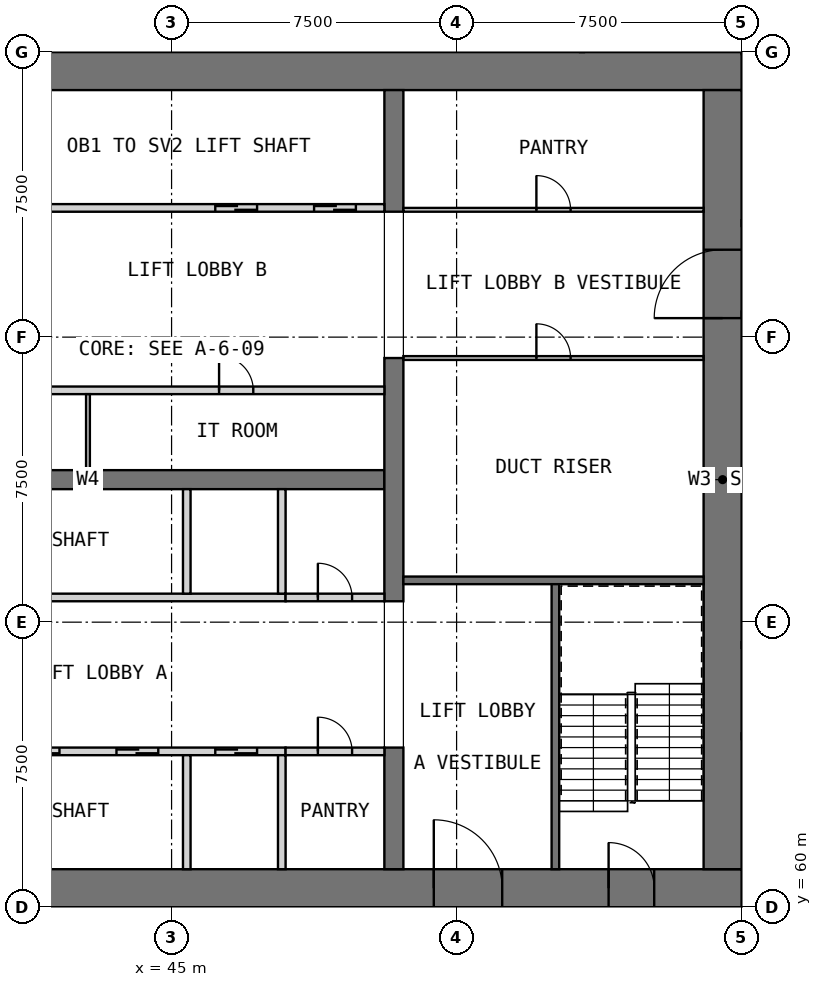
"""IFC4 building model, lengths in metres.
Left out: names, types, materials, properties, quantities, classifications, styles, units other than length and angle.
Written with IfcOpenShell. Run it as: python <this file> out.ifc"""

import sys

from ifc_helpers import new_model, si_unit, direction, frame, frame_2d, origin, place, context, subcontext, project, spatial, rectangle, extrude, element, fill, save


model = new_model("IFC4")
c1 = context("Model", 3, precision=1e-05, world=origin(), true_north=direction((0.0, 1.0)))
c2 = subcontext(c1, "Body", "Model", "MODEL_VIEW")
j1 = project(units=[si_unit("LENGTHUNIT", "METRE"), si_unit("PLANEANGLEUNIT", "RADIAN")], contexts=[c1])
p1 = place(None, origin())
s1 = spatial("IfcSite", under=j1, at=p1, CompositionType="ELEMENT")
p2 = place(p1, origin())
s2 = spatial("IfcBuilding", under=s1, at=p2, CompositionType="ELEMENT")
p3 = place(p2, frame((0.0, 0.0, 34.0)))
s3 = spatial("IfcBuildingStorey", under=s2, at=p3, CompositionType="ELEMENT", Elevation=34.0)
p4 = place(p3, frame((30.0, 60.5, 0.0), z_axis=(0.0, 0.0, 1.0), x_axis=(1.0, 0.0, 0.0)))
e1 = element("IfcWall", 1, at=p4, inside=s3, PredefinedType="SHEAR", context=c2, shape_type="SweptSolid", body=[
    extrude(rectangle(XDim=30.0, YDim=1.0, at=frame_2d((15.0, 0.0))), origin(), (0.0, 0.0, 1.0), 3.6),
])
p5 = place(p4, frame((21.9, 0.0, 0.0)))
e2 = element("IfcOpeningElement", 2, at=p5, cuts=e1, PredefinedType="OPENING", context=c2, shape_type="SweptSolid", body=[
    extrude(rectangle(XDim=1.8, YDim=2.1, at=frame_2d((0.9, 1.05))), frame((0.0, 0.51, 0.0), z_axis=(0.0, -1.0, 0.0), x_axis=(1.0, 0.0, 0.0)), (0.0, 0.0, 1.0), 1.02),
])
p6 = place(p4, frame((26.5, 0.0, 0.0)))
e3 = element("IfcOpeningElement", 3, at=p6, cuts=e1, PredefinedType="OPENING", context=c2, shape_type="SweptSolid", body=[
    extrude(rectangle(XDim=1.2, YDim=2.1, at=frame_2d((0.6, 1.05))), frame((0.0, 0.51, 0.0), z_axis=(0.0, -1.0, 0.0), x_axis=(1.0, 0.0, 0.0)), (0.0, 0.0, 1.0), 1.02),
])
p7 = place(p3, frame((30.0, 82.0, 0.0), z_axis=(0.0, 0.0, 1.0), x_axis=(1.0, 0.0, 0.0)))
e4 = element("IfcWall", 4, at=p7, inside=s3, PredefinedType="SHEAR", context=c2, shape_type="SweptSolid", body=[
    extrude(rectangle(XDim=30.0, YDim=1.0, at=frame_2d((15.0, 0.0))), origin(), (0.0, 0.0, 1.0), 3.6),
])
p8 = place(p3, frame((59.5, 61.0, 0.0), z_axis=(0.0, 0.0, 1.0), x_axis=(0.0, 1.0, 0.0)))
e5 = element("IfcWall", 5, at=p8, inside=s3, PredefinedType="SHEAR", context=c2, shape_type="SweptSolid", body=[
    extrude(rectangle(XDim=20.5, YDim=1.0, at=frame_2d((10.25, 0.0))), origin(), (0.0, 0.0, 1.0), 3.6),
])
p9 = place(p8, frame((14.5, 0.0, 0.0)))
e6 = element("IfcOpeningElement", 6, at=p9, cuts=e5, PredefinedType="OPENING", context=c2, shape_type="SweptSolid", body=[
    extrude(rectangle(XDim=1.8, YDim=2.1, at=frame_2d((0.9, 1.05))), frame((0.0, 0.51, 0.0), z_axis=(0.0, -1.0, 0.0), x_axis=(1.0, 0.0, 0.0)), (0.0, 0.0, 1.0), 1.02),
])
p10 = place(p3, frame((35.0, 71.25, 0.0), z_axis=(0.0, 0.0, 1.0), x_axis=(1.0, 0.0, 0.0)))
e7 = element("IfcWall", 7, at=p10, inside=s3, PredefinedType="SHEAR", context=c2, shape_type="SweptSolid", body=[
    extrude(rectangle(XDim=15.6, YDim=0.5, at=frame_2d((7.8, 0.0))), origin(), (0.0, 0.0, 1.0), 3.6),
])
p11 = place(p3, frame((50.85, 61.0, 0.0), z_axis=(0.0, 0.0, 1.0), x_axis=(0.0, 1.0, 0.0)))
e8 = element("IfcWall", 8, at=p11, inside=s3, PredefinedType="SHEAR", context=c2, shape_type="SweptSolid", body=[
    extrude(rectangle(XDim=3.2, YDim=0.5, at=frame_2d((1.6, 0.0))), origin(), (0.0, 0.0, 1.0), 3.6),
])
p12 = place(p3, frame((50.85, 68.05, 0.0), z_axis=(0.0, 0.0, 1.0), x_axis=(0.0, 1.0, 0.0)))
e9 = element("IfcWall", 9, at=p12, inside=s3, PredefinedType="SHEAR", context=c2, shape_type="SweptSolid", body=[
    extrude(rectangle(XDim=6.4, YDim=0.5, at=frame_2d((3.2, 0.0))), origin(), (0.0, 0.0, 1.0), 3.6),
])
p13 = place(p3, frame((50.85, 78.3, 0.0), z_axis=(0.0, 0.0, 1.0), x_axis=(0.0, 1.0, 0.0)))
e10 = element("IfcWall", 10, at=p13, inside=s3, PredefinedType="SHEAR", context=c2, shape_type="SweptSolid", body=[
    extrude(rectangle(XDim=3.2, YDim=0.5, at=frame_2d((1.6, 0.0))), origin(), (0.0, 0.0, 1.0), 3.6),
])
p14 = place(p3, frame((35.0, 64.1, 0.0), z_axis=(0.0, 0.0, 1.0), x_axis=(1.0, 0.0, 0.0)))
e11 = element("IfcWall", 11, at=p14, inside=s3, PredefinedType="SOLIDWALL", context=c2, shape_type="SweptSolid", body=[
    extrude(rectangle(XDim=13.0, YDim=0.2, at=frame_2d((6.5, 0.0))), origin(), (0.0, 0.0, 1.0), 3.6),
])
p15 = place(p14, frame((0.75, 0.0, 0.0)))
e12 = element("IfcOpeningElement", 12, at=p15, cuts=e11, PredefinedType="OPENING", context=c2, shape_type="SweptSolid", body=[
    extrude(rectangle(XDim=1.1, YDim=2.1, at=frame_2d((0.55, 1.05))), frame((0.0, 0.11, 0.0), z_axis=(0.0, -1.0, 0.0), x_axis=(1.0, 0.0, 0.0)), (0.0, 0.0, 1.0), 0.22),
])
p16 = place(p14, frame((3.35, 0.0, 0.0)))
e13 = element("IfcOpeningElement", 13, at=p16, cuts=e11, PredefinedType="OPENING", context=c2, shape_type="SweptSolid", body=[
    extrude(rectangle(XDim=1.1, YDim=2.1, at=frame_2d((0.55, 1.05))), frame((0.0, 0.11, 0.0), z_axis=(0.0, -1.0, 0.0), x_axis=(1.0, 0.0, 0.0)), (0.0, 0.0, 1.0), 0.22),
])
p17 = place(p14, frame((5.95, 0.0, 0.0)))
e14 = element("IfcOpeningElement", 14, at=p17, cuts=e11, PredefinedType="OPENING", context=c2, shape_type="SweptSolid", body=[
    extrude(rectangle(XDim=1.1, YDim=2.1, at=frame_2d((0.55, 1.05))), frame((0.0, 0.11, 0.0), z_axis=(0.0, -1.0, 0.0), x_axis=(1.0, 0.0, 0.0)), (0.0, 0.0, 1.0), 0.22),
])
p18 = place(p14, frame((8.55, 0.0, 0.0)))
e15 = element("IfcOpeningElement", 15, at=p18, cuts=e11, PredefinedType="OPENING", context=c2, shape_type="SweptSolid", body=[
    extrude(rectangle(XDim=1.1, YDim=2.1, at=frame_2d((0.55, 1.05))), frame((0.0, 0.11, 0.0), z_axis=(0.0, -1.0, 0.0), x_axis=(1.0, 0.0, 0.0)), (0.0, 0.0, 1.0), 0.22),
])
p19 = place(p14, frame((11.15, 0.0, 0.0)))
e16 = element("IfcOpeningElement", 16, at=p19, cuts=e11, PredefinedType="OPENING", context=c2, shape_type="SweptSolid", body=[
    extrude(rectangle(XDim=1.1, YDim=2.1, at=frame_2d((0.55, 1.05))), frame((0.0, 0.11, 0.0), z_axis=(0.0, -1.0, 0.0), x_axis=(1.0, 0.0, 0.0)), (0.0, 0.0, 1.0), 0.22),
])
for number, where, z_axis, x_axis in (
    (17, (45.4, 61.0, 0.0), (0.0, 0.0, 1.0), (0.0, 1.0, 0.0)),
    (18, (47.9, 61.0, 0.0), (0.0, 0.0, 1.0), (0.0, 1.0, 0.0)),
):
    element("IfcWall", number, at=place(p3, frame(where, z_axis=z_axis, x_axis=x_axis)), inside=s3, PredefinedType="SOLIDWALL", context=c2, shape_type="SweptSolid", body=[
        extrude(rectangle(XDim=3.0, YDim=0.2, at=frame_2d((1.5, 0.0))), origin(), (0.0, 0.0, 1.0), 3.6),
    ])
p20 = place(p3, frame((48.0, 64.1, 0.0), z_axis=(0.0, 0.0, 1.0), x_axis=(1.0, 0.0, 0.0)))
e19 = element("IfcWall", 19, at=p20, inside=s3, PredefinedType="PARTITIONING", context=c2, shape_type="SweptSolid", body=[
    extrude(rectangle(XDim=2.6, YDim=0.2, at=frame_2d((1.3, 0.0))), origin(), (0.0, 0.0, 1.0), 3.35),
])
p21 = place(p20, frame((0.85, 0.0, 0.0)))
e20 = element("IfcOpeningElement", 20, at=p21, cuts=e19, PredefinedType="OPENING", context=c2, shape_type="SweptSolid", body=[
    extrude(rectangle(XDim=0.9, YDim=2.1, at=frame_2d((0.45, 1.05))), frame((0.0, 0.11, 0.0), z_axis=(0.0, -1.0, 0.0), x_axis=(1.0, 0.0, 0.0)), (0.0, 0.0, 1.0), 0.22),
])
p22 = place(p3, frame((35.0, 68.15, 0.0), z_axis=(0.0, 0.0, 1.0), x_axis=(1.0, 0.0, 0.0)))
e21 = element("IfcWall", 21, at=p22, inside=s3, PredefinedType="SOLIDWALL", context=c2, shape_type="SweptSolid", body=[
    extrude(rectangle(XDim=13.0, YDim=0.2, at=frame_2d((6.5, 0.0))), origin(), (0.0, 0.0, 1.0), 3.6),
])
p23 = place(p22, frame((0.75, 0.0, 0.0)))
e22 = element("IfcOpeningElement", 22, at=p23, cuts=e21, PredefinedType="OPENING", context=c2, shape_type="SweptSolid", body=[
    extrude(rectangle(XDim=1.1, YDim=2.1, at=frame_2d((0.55, 1.05))), frame((0.0, 0.11, 0.0), z_axis=(0.0, -1.0, 0.0), x_axis=(1.0, 0.0, 0.0)), (0.0, 0.0, 1.0), 0.22),
])
for number, where, z_axis, x_axis in (
    (23, (45.4, 68.25, 0.0), (0.0, 0.0, 1.0), (0.0, 1.0, 0.0)),
    (24, (47.9, 68.25, 0.0), (0.0, 0.0, 1.0), (0.0, 1.0, 0.0)),
):
    element("IfcWall", number, at=place(p3, frame(where, z_axis=z_axis, x_axis=x_axis)), inside=s3, PredefinedType="SOLIDWALL", context=c2, shape_type="SweptSolid", body=[
        extrude(rectangle(XDim=2.75, YDim=0.2, at=frame_2d((1.375, 0.0))), origin(), (0.0, 0.0, 1.0), 3.6),
    ])
p24 = place(p3, frame((48.0, 68.15, 0.0), z_axis=(0.0, 0.0, 1.0), x_axis=(1.0, 0.0, 0.0)))
e25 = element("IfcWall", 25, at=p24, inside=s3, PredefinedType="PARTITIONING", context=c2, shape_type="SweptSolid", body=[
    extrude(rectangle(XDim=2.6, YDim=0.2, at=frame_2d((1.3, 0.0))), origin(), (0.0, 0.0, 1.0), 3.35),
])
p25 = place(p24, frame((0.85, 0.0, 0.0)))
e26 = element("IfcOpeningElement", 26, at=p25, cuts=e25, PredefinedType="OPENING", context=c2, shape_type="SweptSolid", body=[
    extrude(rectangle(XDim=0.9, YDim=2.1, at=frame_2d((0.45, 1.05))), frame((0.0, 0.11, 0.0), z_axis=(0.0, -1.0, 0.0), x_axis=(1.0, 0.0, 0.0)), (0.0, 0.0, 1.0), 0.22),
])
p26 = place(p3, frame((35.0, 73.6, 0.0), z_axis=(0.0, 0.0, 1.0), x_axis=(1.0, 0.0, 0.0)))
e27 = element("IfcWall", 27, at=p26, inside=s3, PredefinedType="PARTITIONING", context=c2, shape_type="SweptSolid", body=[
    extrude(rectangle(XDim=15.6, YDim=0.2, at=frame_2d((7.8, 0.0))), origin(), (0.0, 0.0, 1.0), 3.35),
])
p27 = place(p26, frame((3.45, 0.0, 0.0)))
e28 = element("IfcOpeningElement", 28, at=p27, cuts=e27, PredefinedType="OPENING", context=c2, shape_type="SweptSolid", body=[
    extrude(rectangle(XDim=0.9, YDim=2.1, at=frame_2d((0.45, 1.05))), frame((0.0, 0.11, 0.0), z_axis=(0.0, -1.0, 0.0), x_axis=(1.0, 0.0, 0.0)), (0.0, 0.0, 1.0), 0.22),
])
p28 = place(p26, frame((11.25, 0.0, 0.0)))
e29 = element("IfcOpeningElement", 29, at=p28, cuts=e27, PredefinedType="OPENING", context=c2, shape_type="SweptSolid", body=[
    extrude(rectangle(XDim=0.9, YDim=2.1, at=frame_2d((0.45, 1.05))), frame((0.0, 0.11, 0.0), z_axis=(0.0, -1.0, 0.0), x_axis=(1.0, 0.0, 0.0)), (0.0, 0.0, 1.0), 0.22),
])
p29 = place(p3, frame((42.8, 71.5, 0.0), z_axis=(0.0, 0.0, 1.0), x_axis=(0.0, 1.0, 0.0)))
e30 = element("IfcWall", 30, at=p29, inside=s3, PredefinedType="PARTITIONING", context=c2, shape_type="SweptSolid", body=[
    extrude(rectangle(XDim=2.0, YDim=0.1, at=frame_2d((1.0, 0.0))), origin(), (0.0, 0.0, 1.0), 3.35),
])
p30 = place(p3, frame((35.0, 78.4, 0.0), z_axis=(0.0, 0.0, 1.0), x_axis=(1.0, 0.0, 0.0)))
e31 = element("IfcWall", 31, at=p30, inside=s3, PredefinedType="SOLIDWALL", context=c2, shape_type="SweptSolid", body=[
    extrude(rectangle(XDim=15.6, YDim=0.2, at=frame_2d((7.8, 0.0))), origin(), (0.0, 0.0, 1.0), 3.6),
])
p31 = place(p30, frame((0.75, 0.0, 0.0)))
e32 = element("IfcOpeningElement", 32, at=p31, cuts=e31, PredefinedType="OPENING", context=c2, shape_type="SweptSolid", body=[
    extrude(rectangle(XDim=1.1, YDim=2.1, at=frame_2d((0.55, 1.05))), frame((0.0, 0.11, 0.0), z_axis=(0.0, -1.0, 0.0), x_axis=(1.0, 0.0, 0.0)), (0.0, 0.0, 1.0), 0.22),
])
p32 = place(p30, frame((3.35, 0.0, 0.0)))
e33 = element("IfcOpeningElement", 33, at=p32, cuts=e31, PredefinedType="OPENING", context=c2, shape_type="SweptSolid", body=[
    extrude(rectangle(XDim=1.1, YDim=2.1, at=frame_2d((0.55, 1.05))), frame((0.0, 0.11, 0.0), z_axis=(0.0, -1.0, 0.0), x_axis=(1.0, 0.0, 0.0)), (0.0, 0.0, 1.0), 0.22),
])
p33 = place(p30, frame((11.15, 0.0, 0.0)))
e34 = element("IfcOpeningElement", 34, at=p33, cuts=e31, PredefinedType="OPENING", context=c2, shape_type="SweptSolid", body=[
    extrude(rectangle(XDim=1.1, YDim=2.1, at=frame_2d((0.55, 1.05))), frame((0.0, 0.11, 0.0), z_axis=(0.0, -1.0, 0.0), x_axis=(1.0, 0.0, 0.0)), (0.0, 0.0, 1.0), 0.22),
])
p34 = place(p30, frame((13.75, 0.0, 0.0)))
e35 = element("IfcOpeningElement", 35, at=p34, cuts=e31, PredefinedType="OPENING", context=c2, shape_type="SweptSolid", body=[
    extrude(rectangle(XDim=1.1, YDim=2.1, at=frame_2d((0.55, 1.05))), frame((0.0, 0.11, 0.0), z_axis=(0.0, -1.0, 0.0), x_axis=(1.0, 0.0, 0.0)), (0.0, 0.0, 1.0), 0.22),
])
p35 = place(p3, frame((55.1, 61.0, 0.0), z_axis=(0.0, 0.0, 1.0), x_axis=(0.0, 1.0, 0.0)))
e36 = element("IfcWall", 36, at=p35, inside=s3, PredefinedType="SOLIDWALL", context=c2, shape_type="SweptSolid", body=[
    extrude(rectangle(XDim=7.6, YDim=0.2, at=frame_2d((3.8, 0.0))), origin(), (0.0, 0.0, 1.0), 3.35),
])
p36 = place(p3, frame((51.1, 68.6, 0.0), z_axis=(0.0, 0.0, 1.0), x_axis=(1.0, 0.0, 0.0)))
e37 = element("IfcWall", 37, at=p36, inside=s3, PredefinedType="SOLIDWALL", context=c2, shape_type="SweptSolid", body=[
    extrude(rectangle(XDim=7.9, YDim=0.2, at=frame_2d((3.95, 0.0))), origin(), (0.0, 0.0, 1.0), 3.35),
])
p37 = place(p3, frame((51.1, 74.45, 0.0), z_axis=(0.0, 0.0, 1.0), x_axis=(1.0, 0.0, 0.0)))
e38 = element("IfcWall", 38, at=p37, inside=s3, PredefinedType="PARTITIONING", context=c2, shape_type="SweptSolid", body=[
    extrude(rectangle(XDim=7.9, YDim=0.1, at=frame_2d((3.95, 0.0))), origin(), (0.0, 0.0, 1.0), 3.35),
])
p38 = place(p37, frame((3.5, 0.0, 0.0)))
e39 = element("IfcOpeningElement", 39, at=p38, cuts=e38, PredefinedType="OPENING", context=c2, shape_type="SweptSolid", body=[
    extrude(rectangle(XDim=0.9, YDim=2.1, at=frame_2d((0.45, 1.05))), frame((0.0, 0.06, 0.0), z_axis=(0.0, -1.0, 0.0), x_axis=(1.0, 0.0, 0.0)), (0.0, 0.0, 1.0), 0.12),
])
p39 = place(p3, frame((51.1, 78.35, 0.0), z_axis=(0.0, 0.0, 1.0), x_axis=(1.0, 0.0, 0.0)))
e40 = element("IfcWall", 40, at=p39, inside=s3, PredefinedType="PARTITIONING", context=c2, shape_type="SweptSolid", body=[
    extrude(rectangle(XDim=7.9, YDim=0.1, at=frame_2d((3.95, 0.0))), origin(), (0.0, 0.0, 1.0), 3.35),
])
p40 = place(p39, frame((3.5, 0.0, 0.0)))
e41 = element("IfcOpeningElement", 41, at=p40, cuts=e40, PredefinedType="OPENING", context=c2, shape_type="SweptSolid", body=[
    extrude(rectangle(XDim=0.9, YDim=2.1, at=frame_2d((0.45, 1.05))), frame((0.0, 0.06, 0.0), z_axis=(0.0, -1.0, 0.0), x_axis=(1.0, 0.0, 0.0)), (0.0, 0.0, 1.0), 0.12),
])
p41 = place(p3, frame((60.0, 82.5, 0.0), z_axis=(0.0, 0.0, 1.0), x_axis=(1.0, 0.0, 0.0)))
e42 = element("IfcWall", 42, at=p41, inside=s3, PredefinedType="PARTITIONING", context=c2, shape_type="SweptSolid", body=[
    extrude(rectangle(XDim=14.925, YDim=0.1, at=frame_2d((7.462, 0.0))), origin(), (0.0, 0.0, 1.0), 3.35),
])
p42 = place(p3, frame((55.8, 82.5, 0.0), z_axis=(0.0, 0.0, 1.0), x_axis=(0.0, 1.0, 0.0)))
e43 = element("IfcWall", 43, at=p42, inside=s3, PredefinedType="PARTITIONING", context=c2, shape_type="SweptSolid", body=[
    extrude(rectangle(XDim=7.425, YDim=0.1, at=frame_2d((3.712, 0.0))), origin(), (0.0, 0.0, 1.0), 3.35),
])
p43 = place(p17, origin())
e44 = element("IfcDoor", 44, at=p43, inside=s3, OperationType="DOUBLE_DOOR_SLIDING", PredefinedType="DOOR", context=c2, shape_type="SweptSolid", body=[
    extrude(rectangle(XDim=1.1, YDim=2.1, at=frame_2d((0.55, 1.05))), frame((0.0, 0.025, 0.0), z_axis=(0.0, -1.0, 0.0), x_axis=(1.0, 0.0, 0.0)), (0.0, 0.0, 1.0), 0.05),
])
fill(e14, e44)
p44 = place(p18, origin())
e45 = element("IfcDoor", 45, at=p44, inside=s3, OperationType="DOUBLE_DOOR_SLIDING", PredefinedType="DOOR", context=c2, shape_type="SweptSolid", body=[
    extrude(rectangle(XDim=1.1, YDim=2.1, at=frame_2d((0.55, 1.05))), frame((0.0, 0.025, 0.0), z_axis=(0.0, -1.0, 0.0), x_axis=(1.0, 0.0, 0.0)), (0.0, 0.0, 1.0), 0.05),
])
fill(e15, e45)
p45 = place(p19, origin())
e46 = element("IfcDoor", 46, at=p45, inside=s3, OperationType="DOUBLE_DOOR_SLIDING", PredefinedType="DOOR", context=c2, shape_type="SweptSolid", body=[
    extrude(rectangle(XDim=1.1, YDim=2.1, at=frame_2d((0.55, 1.05))), frame((0.0, 0.025, 0.0), z_axis=(0.0, -1.0, 0.0), x_axis=(1.0, 0.0, 0.0)), (0.0, 0.0, 1.0), 0.05),
])
fill(e16, e46)
p46 = place(p21, origin())
e47 = element("IfcDoor", 47, at=p46, inside=s3, OperationType="SINGLE_SWING_RIGHT", PredefinedType="DOOR", context=c2, shape_type="SweptSolid", body=[
    extrude(rectangle(XDim=0.9, YDim=2.1, at=frame_2d((0.45, 1.05))), frame((0.0, 0.025, 0.0), z_axis=(0.0, -1.0, 0.0), x_axis=(1.0, 0.0, 0.0)), (0.0, 0.0, 1.0), 0.05),
])
fill(e20, e47)
p47 = place(p25, origin())
e48 = element("IfcDoor", 48, at=p47, inside=s3, OperationType="SINGLE_SWING_RIGHT", PredefinedType="DOOR", context=c2, shape_type="SweptSolid", body=[
    extrude(rectangle(XDim=0.9, YDim=2.1, at=frame_2d((0.45, 1.05))), frame((0.0, 0.025, 0.0), z_axis=(0.0, -1.0, 0.0), x_axis=(1.0, 0.0, 0.0)), (0.0, 0.0, 1.0), 0.05),
])
fill(e26, e48)
p48 = place(p28, origin())
e49 = element("IfcDoor", 49, at=p48, inside=s3, OperationType="SINGLE_SWING_LEFT", PredefinedType="DOOR", context=c2, shape_type="SweptSolid", body=[
    extrude(rectangle(XDim=0.9, YDim=2.1, at=frame_2d((0.45, 1.05))), frame((0.0, 0.025, 0.0), z_axis=(0.0, -1.0, 0.0), x_axis=(1.0, 0.0, 0.0)), (0.0, 0.0, 1.0), 0.05),
])
fill(e29, e49)
p49 = place(p33, origin())
e50 = element("IfcDoor", 50, at=p49, inside=s3, OperationType="DOUBLE_DOOR_SLIDING", PredefinedType="DOOR", context=c2, shape_type="SweptSolid", body=[
    extrude(rectangle(XDim=1.1, YDim=2.1, at=frame_2d((0.55, 1.05))), frame((0.0, 0.025, 0.0), z_axis=(0.0, -1.0, 0.0), x_axis=(1.0, 0.0, 0.0)), (0.0, 0.0, 1.0), 0.05),
])
fill(e34, e50)
p50 = place(p34, origin())
e51 = element("IfcDoor", 51, at=p50, inside=s3, OperationType="DOUBLE_DOOR_SLIDING", PredefinedType="DOOR", context=c2, shape_type="SweptSolid", body=[
    extrude(rectangle(XDim=1.1, YDim=2.1, at=frame_2d((0.55, 1.05))), frame((0.0, 0.025, 0.0), z_axis=(0.0, -1.0, 0.0), x_axis=(1.0, 0.0, 0.0)), (0.0, 0.0, 1.0), 0.05),
])
fill(e35, e51)
p51 = place(p5, origin())
e52 = element("IfcDoor", 52, at=p51, inside=s3, OperationType="DOUBLE_DOOR_SINGLE_SWING", PredefinedType="DOOR", context=c2, shape_type="SweptSolid", body=[
    extrude(rectangle(XDim=1.8, YDim=2.1, at=frame_2d((0.9, 1.05))), frame((0.0, 0.025, 0.0), z_axis=(0.0, -1.0, 0.0), x_axis=(1.0, 0.0, 0.0)), (0.0, 0.0, 1.0), 0.05),
])
fill(e2, e52)
p52 = place(p9, origin())
e53 = element("IfcDoor", 53, at=p52, inside=s3, OperationType="DOUBLE_DOOR_SINGLE_SWING", PredefinedType="DOOR", context=c2, shape_type="SweptSolid", body=[
    extrude(rectangle(XDim=1.8, YDim=2.1, at=frame_2d((0.9, 1.05))), frame((0.0, 0.025, 0.0), z_axis=(0.0, -1.0, 0.0), x_axis=(1.0, 0.0, 0.0)), (0.0, 0.0, 1.0), 0.05),
])
fill(e6, e53)
p53 = place(p6, origin())
e54 = element("IfcDoor", 54, at=p53, inside=s3, OperationType="SINGLE_SWING_LEFT", PredefinedType="DOOR", context=c2, shape_type="SweptSolid", body=[
    extrude(rectangle(XDim=1.2, YDim=2.1, at=frame_2d((0.6, 1.05))), frame((0.0, 0.025, 0.0), z_axis=(0.0, -1.0, 0.0), x_axis=(1.0, 0.0, 0.0)), (0.0, 0.0, 1.0), 0.05),
])
fill(e3, e54)
p54 = place(p38, origin())
e55 = element("IfcDoor", 55, at=p54, inside=s3, OperationType="SINGLE_SWING_RIGHT", PredefinedType="DOOR", context=c2, shape_type="SweptSolid", body=[
    extrude(rectangle(XDim=0.9, YDim=2.1, at=frame_2d((0.45, 1.05))), frame((0.0, 0.025, 0.0), z_axis=(0.0, -1.0, 0.0), x_axis=(1.0, 0.0, 0.0)), (0.0, 0.0, 1.0), 0.05),
])
fill(e39, e55)
p55 = place(p40, origin())
e56 = element("IfcDoor", 56, at=p55, inside=s3, OperationType="SINGLE_SWING_RIGHT", PredefinedType="DOOR", context=c2, shape_type="SweptSolid", body=[
    extrude(rectangle(XDim=0.9, YDim=2.1, at=frame_2d((0.45, 1.05))), frame((0.0, 0.025, 0.0), z_axis=(0.0, -1.0, 0.0), x_axis=(1.0, 0.0, 0.0)), (0.0, 0.0, 1.0), 0.05),
])
fill(e41, e56)
save(model, sys.argv[1])
